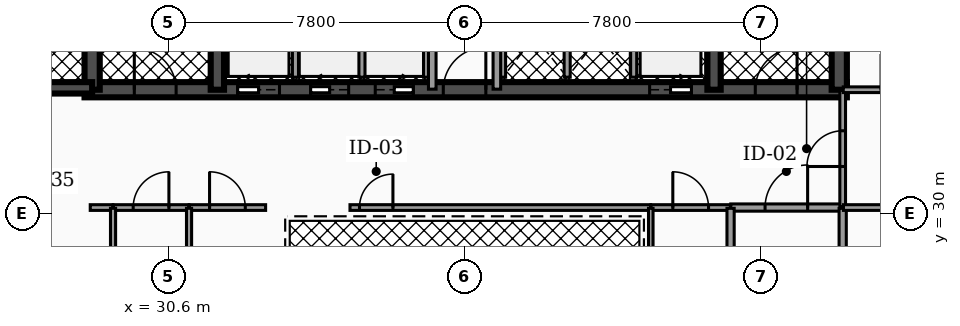
"""IFC4 building model, lengths in metres.
Left out: names, types, materials, properties, quantities, classifications, styles, units other than length and angle.
Written with IfcOpenShell. Run it as: python <this file> out.ifc"""

import sys

from ifc_helpers import new_model, si_unit, direction, frame, frame_2d, origin, place, context, subcontext, project, spatial, rectangle, extrude, element, fill, save


model = new_model("IFC4")
c1 = context("Model", 3, precision=1e-05, world=origin(), true_north=direction((0.0, 1.0)))
c2 = subcontext(c1, "Body", "Model", "MODEL_VIEW")
j1 = project(units=[si_unit("LENGTHUNIT", "METRE"), si_unit("PLANEANGLEUNIT", "RADIAN")], contexts=[c1])
p1 = place(None, origin())
s1 = spatial("IfcSite", under=j1, at=p1, CompositionType="ELEMENT")
p2 = place(p1, origin())
s2 = spatial("IfcBuilding", under=s1, at=p2, CompositionType="ELEMENT")
p3 = place(p2, frame((0.0, 0.0, 142.12)))
s3 = spatial("IfcBuildingStorey", under=s2, at=p3, CompositionType="ELEMENT", Elevation=142.12)
p4 = place(p3, frame((28.4, 33.25, 0.0), z_axis=(0.0, 0.0, 1.0), x_axis=(1.0, 0.0, 0.0)))
e1 = element("IfcWall", 1, at=p4, inside=s3, PredefinedType="SHEAR", context=c2, shape_type="SweptSolid", body=[
    extrude(rectangle(XDim=20.06, YDim=0.4, at=frame_2d((10.03, 0.0))), origin(), (0.0, 0.0, 1.0), 3.5),
])
p5 = place(p4, frame((4.03, 0.0, 0.0)))
e2 = element("IfcOpeningElement", 2, at=p5, cuts=e1, PredefinedType="OPENING", context=c2, shape_type="SweptSolid", body=[
    extrude(rectangle(XDim=1.1, YDim=2.15, at=frame_2d((0.55, 1.075))), frame((0.0, 0.21, 0.0), z_axis=(0.0, -1.0, 0.0), x_axis=(1.0, 0.0, 0.0)), (0.0, 0.0, 1.0), 0.42),
])
p6 = place(p4, frame((14.87, 0.0, 0.0)))
e3 = element("IfcOpeningElement", 3, at=p6, cuts=e1, PredefinedType="OPENING", context=c2, shape_type="SweptSolid", body=[
    extrude(rectangle(XDim=1.1, YDim=2.15, at=frame_2d((0.55, 1.075))), frame((0.0, 0.21, 0.0), z_axis=(0.0, -1.0, 0.0), x_axis=(1.0, 0.0, 0.0)), (0.0, 0.0, 1.0), 0.42),
])
p7 = place(p4, frame((5.95, 0.0, 0.0)))
e4 = element("IfcOpeningElement", 4, at=p7, cuts=e1, PredefinedType="OPENING", context=c2, shape_type="SweptSolid", body=[
    extrude(rectangle(XDim=1.0, YDim=2.1, at=frame_2d((0.5, 1.05))), frame((0.0, 0.21, 0.0), z_axis=(0.0, -1.0, 0.0), x_axis=(1.0, 0.0, 0.0)), (0.0, 0.0, 1.0), 0.42),
])
p8 = place(p4, frame((7.65, 0.0, 0.0)))
e5 = element("IfcOpeningElement", 5, at=p8, cuts=e1, PredefinedType="OPENING", context=c2, shape_type="SweptSolid", body=[
    extrude(rectangle(XDim=1.0, YDim=2.1, at=frame_2d((0.5, 1.05))), frame((0.0, 0.21, 0.0), z_axis=(0.0, -1.0, 0.0), x_axis=(1.0, 0.0, 0.0)), (0.0, 0.0, 1.0), 0.42),
])
p9 = place(p4, frame((1.31, 0.0, 0.0)))
e6 = element("IfcOpeningElement", 6, at=p9, cuts=e1, PredefinedType="OPENING", context=c2, shape_type="SweptSolid", body=[
    extrude(rectangle(XDim=1.1, YDim=2.2, at=frame_2d((0.55, 1.1))), frame((0.0, 0.21, 0.0), z_axis=(0.0, -1.0, 0.0), x_axis=(1.0, 0.0, 0.0)), (0.0, 0.0, 1.0), 0.42),
])
p10 = place(p4, frame((9.44, 0.0, 0.0)))
e7 = element("IfcOpeningElement", 7, at=p10, cuts=e1, PredefinedType="OPENING", context=c2, shape_type="SweptSolid", body=[
    extrude(rectangle(XDim=1.12, YDim=2.05, at=frame_2d((0.56, 1.025))), frame((0.0, 0.21, 0.0), z_axis=(0.0, -1.0, 0.0), x_axis=(1.0, 0.0, 0.0)), (0.0, 0.0, 1.0), 0.42),
])
p11 = place(p4, frame((17.65, 0.0, 0.0)))
e8 = element("IfcOpeningElement", 8, at=p11, cuts=e1, PredefinedType="OPENING", context=c2, shape_type="SweptSolid", body=[
    extrude(rectangle(XDim=1.1, YDim=2.2, at=frame_2d((0.55, 1.1))), frame((0.0, 0.21, 0.0), z_axis=(0.0, -1.0, 0.0), x_axis=(1.0, 0.0, 0.0)), (0.0, 0.0, 1.0), 0.42),
])
p12 = place(p3, frame((28.6, 33.25, 0.0), z_axis=(0.0, 0.0, 1.0), x_axis=(0.0, 1.0, 0.0)))
e9 = element("IfcWall", 9, at=p12, inside=s3, PredefinedType="SHEAR", context=c2, shape_type="SweptSolid", body=[
    extrude(rectangle(XDim=10.2, YDim=0.4, at=frame_2d((5.1, 0.0))), origin(), (0.0, 0.0, 1.0), 3.5),
])
for number, where, z_axis, x_axis in (
    (10, (31.895, 33.25, 0.0), (0.0, 0.0, 1.0), (0.0, 1.0, 0.0)),
    (11, (44.965, 33.25, 0.0), (0.0, 0.0, 1.0), (0.0, 1.0, 0.0)),
):
    element("IfcWall", number, at=place(p3, frame(where, z_axis=z_axis, x_axis=x_axis)), inside=s3, PredefinedType="SHEAR", context=c2, shape_type="SweptSolid", body=[
        extrude(rectangle(XDim=10.2, YDim=0.35, at=frame_2d((5.1, 0.0))), origin(), (0.0, 0.0, 1.0), 3.5),
    ])
p13 = place(p3, frame((48.26, 33.25, 0.0), z_axis=(0.0, 0.0, 1.0), x_axis=(0.0, 1.0, 0.0)))
e12 = element("IfcWall", 12, at=p13, inside=s3, PredefinedType="SHEAR", context=c2, shape_type="SweptSolid", body=[
    extrude(rectangle(XDim=10.2, YDim=0.4, at=frame_2d((5.1, 0.0))), origin(), (0.0, 0.0, 1.0), 3.5),
])
p14 = place(p3, frame((25.08, 33.3, 0.0), z_axis=(0.0, 0.0, 1.0), x_axis=(1.0, 0.0, 0.0)))
e13 = element("IfcWall", 13, at=p14, inside=s3, PredefinedType="SHEAR", context=c2, shape_type="SweptSolid", body=[
    extrude(rectangle(XDim=3.52, YDim=0.3, at=frame_2d((1.76, 0.0))), origin(), (0.0, 0.0, 1.0), 3.5),
])
p15 = place(p14, frame((1.335, 0.0, 0.0)))
e14 = element("IfcOpeningElement", 14, at=p15, cuts=e13, PredefinedType="OPENING", context=c2, shape_type="SweptSolid", body=[
    extrude(rectangle(XDim=0.95, YDim=2.2, at=frame_2d((0.475, 1.1))), frame((0.0, 0.16, 0.0), z_axis=(0.0, -1.0, 0.0), x_axis=(1.0, 0.0, 0.0)), (0.0, 0.0, 1.0), 0.32),
])
for number, where, z_axis, x_axis in (
    (15, (33.95, 33.58, 0.0), (0.0, 0.0, 1.0), (0.0, 1.0, 0.0)),
    (16, (42.85, 33.58, 0.0), (0.0, 0.0, 1.0), (0.0, 1.0, 0.0)),
):
    element("IfcWall", number, at=place(p3, frame(where, z_axis=z_axis, x_axis=x_axis)), inside=s3, PredefinedType="SOLIDWALL", context=c2, shape_type="SweptSolid", body=[
        extrude(rectangle(XDim=2.45, YDim=0.16, at=frame_2d((1.225, 0.0))), origin(), (0.0, 0.0, 1.0), 2.472),
    ])
for number, where, z_axis, x_axis in (
    (17, (35.7, 33.58, 0.0), (0.0, 0.0, 1.0), (0.0, 1.0, 0.0)),
    (18, (37.4, 33.58, 0.0), (0.0, 0.0, 1.0), (0.0, 1.0, 0.0)),
    (19, (39.4, 33.58, 0.0), (0.0, 0.0, 1.0), (0.0, 1.0, 0.0)),
    (20, (41.1, 33.58, 0.0), (0.0, 0.0, 1.0), (0.0, 1.0, 0.0)),
):
    element("IfcWall", number, at=place(p3, frame(where, z_axis=z_axis, x_axis=x_axis)), inside=s3, PredefinedType="SOLIDWALL", context=c2, shape_type="SweptSolid", body=[
        extrude(rectangle(XDim=2.25, YDim=0.16, at=frame_2d((1.125, 0.0))), origin(), (0.0, 0.0, 1.0), 2.472),
    ])
p16 = place(p3, frame((37.55, 33.265, 0.0), z_axis=(0.0, 0.0, 1.0), x_axis=(0.0, 1.0, 0.0)))
e21 = element("IfcWall", 21, at=p16, inside=s3, PredefinedType="PARTITIONING", context=c2, shape_type="SweptSolid", body=[
    extrude(rectangle(XDim=4.595, YDim=0.2, at=frame_2d((2.298, 0.0))), origin(), (0.0, 0.0, 1.0), 2.457),
])
p17 = place(p16, frame((3.058, 0.0, 0.0)))
e22 = element("IfcOpeningElement", 22, at=p17, cuts=e21, PredefinedType="OPENING", context=c2, shape_type="SweptSolid", body=[
    extrude(rectangle(XDim=0.88, YDim=2.05, at=frame_2d((0.44, 1.025))), frame((0.0, 0.11, 0.0), z_axis=(0.0, -1.0, 0.0), x_axis=(1.0, 0.0, 0.0)), (0.0, 0.0, 1.0), 0.22),
])
p18 = place(p3, frame((39.25, 33.265, 0.0), z_axis=(0.0, 0.0, 1.0), x_axis=(0.0, 1.0, 0.0)))
e23 = element("IfcWall", 23, at=p18, inside=s3, PredefinedType="PARTITIONING", context=c2, shape_type="SweptSolid", body=[
    extrude(rectangle(XDim=4.595, YDim=0.2, at=frame_2d((2.298, 0.0))), origin(), (0.0, 0.0, 1.0), 2.457),
])
p19 = place(p18, frame((3.058, 0.0, 0.0)))
e24 = element("IfcOpeningElement", 24, at=p19, cuts=e23, PredefinedType="OPENING", context=c2, shape_type="SweptSolid", body=[
    extrude(rectangle(XDim=0.88, YDim=2.05, at=frame_2d((0.44, 1.025))), frame((0.0, 0.11, 0.0), z_axis=(0.0, -1.0, 0.0), x_axis=(1.0, 0.0, 0.0)), (0.0, 0.0, 1.0), 0.22),
])
p20 = place(p3, frame((45.405, 30.15, 0.0), z_axis=(0.0, 0.0, 1.0), x_axis=(1.0, 0.0, 0.0)))
e25 = element("IfcWall", 25, at=p20, inside=s3, PredefinedType="PARTITIONING", context=c2, shape_type="SweptSolid", body=[
    extrude(rectangle(XDim=2.925, YDim=0.19, at=frame_2d((1.462, 0.0))), origin(), (0.0, 0.0, 1.0), 2.457),
])
p21 = place(p20, frame((0.903, 0.0, 0.0)))
e26 = element("IfcOpeningElement", 26, at=p21, cuts=e25, PredefinedType="OPENING", context=c2, shape_type="SweptSolid", body=[
    extrude(rectangle(XDim=1.12, YDim=2.05, at=frame_2d((0.56, 1.025))), frame((0.0, 0.105, 0.0), z_axis=(0.0, -1.0, 0.0), x_axis=(1.0, 0.0, 0.0)), (0.0, 0.0, 1.0), 0.21),
])
p22 = place(p3, frame((48.35, 30.17, 0.0), z_axis=(0.0, 0.0, 1.0), x_axis=(0.0, 1.0, 0.0)))
e27 = element("IfcWall", 27, at=p22, inside=s3, PredefinedType="PARTITIONING", context=c2, shape_type="SweptSolid", body=[
    extrude(rectangle(XDim=3.06, YDim=0.15, at=frame_2d((1.53, 0.0))), origin(), (0.0, 0.0, 1.0), 2.457),
])
p23 = place(p22, frame((1.06, 0.0, 0.0)))
e28 = element("IfcOpeningElement", 28, at=p23, cuts=e27, PredefinedType="OPENING", context=c2, shape_type="SweptSolid", body=[
    extrude(rectangle(XDim=0.94, YDim=2.05, at=frame_2d((0.47, 1.025))), frame((0.0, 0.085, 0.0), z_axis=(0.0, -1.0, 0.0), x_axis=(1.0, 0.0, 0.0)), (0.0, 0.0, 1.0), 0.17),
])
p24 = place(p3, frame((28.55, 30.15, 0.0), z_axis=(0.0, 0.0, 1.0), x_axis=(1.0, 0.0, 0.0)))
e29 = element("IfcWall", 29, at=p24, inside=s3, PredefinedType="PARTITIONING", context=c2, shape_type="SweptSolid", body=[
    extrude(rectangle(XDim=0.595, YDim=0.15, at=frame_2d((0.297, 0.0))), origin(), (0.0, 0.0, 1.0), 2.457),
])
p25 = place(p3, frame((29.155, 30.15, 0.0), z_axis=(0.0, 0.0, 1.0), x_axis=(1.0, 0.0, 0.0)))
e30 = element("IfcWall", 30, at=p25, inside=s3, PredefinedType="PARTITIONING", context=c2, shape_type="SweptSolid", body=[
    extrude(rectangle(XDim=1.99, YDim=0.15, at=frame_2d((0.995, 0.0))), origin(), (0.0, 0.0, 1.0), 2.457),
])
p26 = place(p25, frame((0.525, 0.0, 0.0)))
e31 = element("IfcOpeningElement", 31, at=p26, cuts=e30, PredefinedType="OPENING", context=c2, shape_type="SweptSolid", body=[
    extrude(rectangle(XDim=0.94, YDim=2.05, at=frame_2d((0.47, 1.025))), frame((0.0, 0.085, 0.0), z_axis=(0.0, -1.0, 0.0), x_axis=(1.0, 0.0, 0.0)), (0.0, 0.0, 1.0), 0.17),
])
p27 = place(p3, frame((31.155, 30.15, 0.0), z_axis=(0.0, 0.0, 1.0), x_axis=(1.0, 0.0, 0.0)))
e32 = element("IfcWall", 32, at=p27, inside=s3, PredefinedType="PARTITIONING", context=c2, shape_type="SweptSolid", body=[
    extrude(rectangle(XDim=2.01, YDim=0.15, at=frame_2d((1.005, 0.0))), origin(), (0.0, 0.0, 1.0), 2.457),
])
p28 = place(p27, frame((0.535, 0.0, 0.0)))
e33 = element("IfcOpeningElement", 33, at=p28, cuts=e32, PredefinedType="OPENING", context=c2, shape_type="SweptSolid", body=[
    extrude(rectangle(XDim=0.94, YDim=2.05, at=frame_2d((0.47, 1.025))), frame((0.0, 0.085, 0.0), z_axis=(0.0, -1.0, 0.0), x_axis=(1.0, 0.0, 0.0)), (0.0, 0.0, 1.0), 0.17),
])
p29 = place(p3, frame((35.385, 30.15, 0.0), z_axis=(0.0, 0.0, 1.0), x_axis=(1.0, 0.0, 0.0)))
e34 = element("IfcWall", 34, at=p29, inside=s3, PredefinedType="PARTITIONING", context=c2, shape_type="SweptSolid", body=[
    extrude(rectangle(XDim=7.91, YDim=0.15, at=frame_2d((3.955, 0.0))), origin(), (0.0, 0.0, 1.0), 2.457),
])
p30 = place(p29, frame((0.25, 0.0, 0.0)))
e35 = element("IfcOpeningElement", 35, at=p30, cuts=e34, PredefinedType="OPENING", context=c2, shape_type="SweptSolid", body=[
    extrude(rectangle(XDim=0.88, YDim=2.05, at=frame_2d((0.44, 1.025))), frame((0.0, 0.085, 0.0), z_axis=(0.0, -1.0, 0.0), x_axis=(1.0, 0.0, 0.0)), (0.0, 0.0, 1.0), 0.17),
])
p31 = place(p3, frame((43.305, 30.15, 0.0), z_axis=(0.0, 0.0, 1.0), x_axis=(1.0, 0.0, 0.0)))
e36 = element("IfcWall", 36, at=p31, inside=s3, PredefinedType="PARTITIONING", context=c2, shape_type="SweptSolid", body=[
    extrude(rectangle(XDim=2.09, YDim=0.15, at=frame_2d((1.045, 0.0))), origin(), (0.0, 0.0, 1.0), 2.457),
])
p32 = place(p31, frame((0.575, 0.0, 0.0)))
e37 = element("IfcOpeningElement", 37, at=p32, cuts=e36, PredefinedType="OPENING", context=c2, shape_type="SweptSolid", body=[
    extrude(rectangle(XDim=0.94, YDim=2.05, at=frame_2d((0.47, 1.025))), frame((0.0, 0.085, 0.0), z_axis=(0.0, -1.0, 0.0), x_axis=(1.0, 0.0, 0.0)), (0.0, 0.0, 1.0), 0.17),
])
for number, where, z_axis, x_axis in (
    (38, (45.4, 27.37, 0.0), (0.0, 0.0, 1.0), (0.0, 1.0, 0.0)),
    (39, (48.35, 27.37, 0.0), (0.0, 0.0, 1.0), (0.0, 1.0, 0.0)),
):
    element("IfcWall", number, at=place(p3, frame(where, z_axis=z_axis, x_axis=x_axis)), inside=s3, PredefinedType="PARTITIONING", context=c2, shape_type="SweptSolid", body=[
        extrude(rectangle(XDim=2.76, YDim=0.19, at=frame_2d((1.38, 0.0))), origin(), (0.0, 0.0, 1.0), 2.457),
    ])
p33 = place(p3, frame((48.37, 30.15, 0.0), z_axis=(0.0, 0.0, 1.0), x_axis=(1.0, 0.0, 0.0)))
e40 = element("IfcWall", 40, at=p33, inside=s3, PredefinedType="PARTITIONING", context=c2, shape_type="SweptSolid", body=[
    extrude(rectangle(XDim=1.309, YDim=0.15, at=frame_2d((0.654, 0.0))), origin(), (0.0, 0.0, 1.0), 2.457),
])
p34 = place(p3, frame((48.365, 33.25, 0.0), z_axis=(0.0, 0.0, 1.0), x_axis=(1.0, 0.0, 0.0)))
e41 = element("IfcWall", 41, at=p34, inside=s3, PredefinedType="PARTITIONING", context=c2, shape_type="SweptSolid", body=[
    extrude(rectangle(XDim=2.93, YDim=0.15, at=frame_2d((1.465, 0.0))), origin(), (0.0, 0.0, 1.0), 2.457),
])
p35 = place(p34, frame((0.995, 0.0, 0.0)))
e42 = element("IfcOpeningElement", 42, at=p35, cuts=e41, PredefinedType="OPENING", context=c2, shape_type="SweptSolid", body=[
    extrude(rectangle(XDim=0.94, YDim=2.05, at=frame_2d((0.47, 1.025))), frame((0.0, 0.085, 0.0), z_axis=(0.0, -1.0, 0.0), x_axis=(1.0, 0.0, 0.0)), (0.0, 0.0, 1.0), 0.17),
])
p36 = place(p3, frame((29.15, 27.17, 0.0), z_axis=(0.0, 0.0, 1.0), x_axis=(0.0, 1.0, 0.0)))
e43 = element("IfcWall", 43, at=p36, inside=s3, PredefinedType="PARTITIONING", context=c2, shape_type="SweptSolid", body=[
    extrude(rectangle(XDim=2.96, YDim=0.135, at=frame_2d((1.48, 0.0))), origin(), (0.0, 0.0, 1.0), 2.457),
])
p37 = place(p36, frame((1.05, 0.0, 0.0)))
e44 = element("IfcOpeningElement", 44, at=p37, cuts=e43, PredefinedType="OPENING", context=c2, shape_type="SweptSolid", body=[
    extrude(rectangle(XDim=0.86, YDim=2.05, at=frame_2d((0.43, 1.025))), frame((0.0, 0.077, 0.0), z_axis=(0.0, -1.0, 0.0), x_axis=(1.0, 0.0, 0.0)), (0.0, 0.0, 1.0), 0.155),
])
p38 = place(p3, frame((31.15, 27.17, 0.0), z_axis=(0.0, 0.0, 1.0), x_axis=(0.0, 1.0, 0.0)))
e45 = element("IfcWall", 45, at=p38, inside=s3, PredefinedType="PARTITIONING", context=c2, shape_type="SweptSolid", body=[
    extrude(rectangle(XDim=2.96, YDim=0.135, at=frame_2d((1.48, 0.0))), origin(), (0.0, 0.0, 1.0), 2.457),
])
p39 = place(p3, frame((43.3, 24.078, 0.0), z_axis=(0.0, 0.0, 1.0), x_axis=(0.0, 1.0, 0.0)))
e46 = element("IfcWall", 46, at=p39, inside=s3, PredefinedType="PARTITIONING", context=c2, shape_type="SweptSolid", body=[
    extrude(rectangle(XDim=6.052, YDim=0.12, at=frame_2d((3.026, 0.0))), origin(), (0.0, 0.0, 1.0), 2.457),
])
p40 = place(p5, origin())
e47 = element("IfcDoor", 47, at=p40, inside=s3, OperationType="SLIDING_TO_LEFT", PredefinedType="DOOR", context=c2, shape_type="SweptSolid", body=[
    extrude(rectangle(XDim=1.1, YDim=2.15, at=frame_2d((0.55, 1.075))), frame((0.0, 0.025, 0.0), z_axis=(0.0, -1.0, 0.0), x_axis=(1.0, 0.0, 0.0)), (0.0, 0.0, 1.0), 0.05),
])
fill(e2, e47)
p41 = place(p6, origin())
e48 = element("IfcDoor", 48, at=p41, inside=s3, OperationType="SLIDING_TO_RIGHT", PredefinedType="DOOR", context=c2, shape_type="SweptSolid", body=[
    extrude(rectangle(XDim=1.1, YDim=2.15, at=frame_2d((0.55, 1.075))), frame((0.0, 0.025, 0.0), z_axis=(0.0, -1.0, 0.0), x_axis=(1.0, 0.0, 0.0)), (0.0, 0.0, 1.0), 0.05),
])
fill(e3, e48)
p42 = place(p7, origin())
e49 = element("IfcDoor", 49, at=p42, inside=s3, OperationType="SLIDING_TO_LEFT", PredefinedType="DOOR", context=c2, shape_type="SweptSolid", body=[
    extrude(rectangle(XDim=1.0, YDim=2.1, at=frame_2d((0.5, 1.05))), frame((0.0, 0.025, 0.0), z_axis=(0.0, -1.0, 0.0), x_axis=(1.0, 0.0, 0.0)), (0.0, 0.0, 1.0), 0.05),
])
fill(e4, e49)
p43 = place(p8, origin())
e50 = element("IfcDoor", 50, at=p43, inside=s3, OperationType="SLIDING_TO_RIGHT", PredefinedType="DOOR", context=c2, shape_type="SweptSolid", body=[
    extrude(rectangle(XDim=1.0, YDim=2.1, at=frame_2d((0.5, 1.05))), frame((0.0, 0.025, 0.0), z_axis=(0.0, -1.0, 0.0), x_axis=(1.0, 0.0, 0.0)), (0.0, 0.0, 1.0), 0.05),
])
fill(e5, e50)
p44 = place(p9, origin())
e51 = element("IfcDoor", 51, at=p44, inside=s3, OperationType="SINGLE_SWING_LEFT", PredefinedType="DOOR", context=c2, shape_type="SweptSolid", body=[
    extrude(rectangle(XDim=1.1, YDim=2.2, at=frame_2d((0.55, 1.1))), frame((0.0, 0.025, 0.0), z_axis=(0.0, -1.0, 0.0), x_axis=(1.0, 0.0, 0.0)), (0.0, 0.0, 1.0), 0.05),
])
fill(e6, e51)
p45 = place(p10, origin())
e52 = element("IfcDoor", 52, at=p45, inside=s3, OperationType="SINGLE_SWING_RIGHT", PredefinedType="DOOR", context=c2, shape_type="SweptSolid", body=[
    extrude(rectangle(XDim=1.12, YDim=2.05, at=frame_2d((0.56, 1.025))), frame((0.0, 0.025, 0.0), z_axis=(0.0, -1.0, 0.0), x_axis=(1.0, 0.0, 0.0)), (0.0, 0.0, 1.0), 0.05),
])
fill(e7, e52)
p46 = place(p11, origin())
e53 = element("IfcDoor", 53, at=p46, inside=s3, OperationType="SINGLE_SWING_RIGHT", PredefinedType="DOOR", context=c2, shape_type="SweptSolid", body=[
    extrude(rectangle(XDim=1.1, YDim=2.2, at=frame_2d((0.55, 1.1))), frame((0.0, 0.025, 0.0), z_axis=(0.0, -1.0, 0.0), x_axis=(1.0, 0.0, 0.0)), (0.0, 0.0, 1.0), 0.05),
])
fill(e8, e53)
p47 = place(p21, origin())
e54 = element("IfcDoor", 54, at=p47, inside=s3, OperationType="SINGLE_SWING_RIGHT", PredefinedType="DOOR", context=c2, shape_type="SweptSolid", body=[
    extrude(rectangle(XDim=1.12, YDim=2.05, at=frame_2d((0.56, 1.025))), frame((0.0, 0.025, 0.0), z_axis=(0.0, -1.0, 0.0), x_axis=(1.0, 0.0, 0.0)), (0.0, 0.0, 1.0), 0.05),
])
fill(e26, e54)
p48 = place(p23, origin())
e55 = element("IfcDoor", 55, at=p48, inside=s3, OperationType="SINGLE_SWING_LEFT", PredefinedType="DOOR", context=c2, shape_type="SweptSolid", body=[
    extrude(rectangle(XDim=0.94, YDim=2.05, at=frame_2d((0.47, 1.025))), frame((0.0, 0.025, 0.0), z_axis=(0.0, -1.0, 0.0), x_axis=(1.0, 0.0, 0.0)), (0.0, 0.0, 1.0), 0.05),
])
fill(e28, e55)
p49 = place(p26, origin())
e56 = element("IfcDoor", 56, at=p49, inside=s3, OperationType="SINGLE_SWING_RIGHT", PredefinedType="DOOR", context=c2, shape_type="SweptSolid", body=[
    extrude(rectangle(XDim=0.94, YDim=2.05, at=frame_2d((0.47, 1.025))), frame((0.0, 0.025, 0.0), z_axis=(0.0, -1.0, 0.0), x_axis=(1.0, 0.0, 0.0)), (0.0, 0.0, 1.0), 0.05),
])
fill(e31, e56)
p50 = place(p28, origin())
e57 = element("IfcDoor", 57, at=p50, inside=s3, OperationType="SINGLE_SWING_LEFT", PredefinedType="DOOR", context=c2, shape_type="SweptSolid", body=[
    extrude(rectangle(XDim=0.94, YDim=2.05, at=frame_2d((0.47, 1.025))), frame((0.0, 0.025, 0.0), z_axis=(0.0, -1.0, 0.0), x_axis=(1.0, 0.0, 0.0)), (0.0, 0.0, 1.0), 0.05),
])
fill(e33, e57)
p51 = place(p30, origin())
e58 = element("IfcDoor", 58, at=p51, inside=s3, OperationType="SINGLE_SWING_RIGHT", PredefinedType="DOOR", context=c2, shape_type="SweptSolid", body=[
    extrude(rectangle(XDim=0.88, YDim=2.05, at=frame_2d((0.44, 1.025))), frame((0.0, 0.025, 0.0), z_axis=(0.0, -1.0, 0.0), x_axis=(1.0, 0.0, 0.0)), (0.0, 0.0, 1.0), 0.05),
])
fill(e35, e58)
p52 = place(p32, origin())
e59 = element("IfcDoor", 59, at=p52, inside=s3, OperationType="SINGLE_SWING_LEFT", PredefinedType="DOOR", context=c2, shape_type="SweptSolid", body=[
    extrude(rectangle(XDim=0.94, YDim=2.05, at=frame_2d((0.47, 1.025))), frame((0.0, 0.025, 0.0), z_axis=(0.0, -1.0, 0.0), x_axis=(1.0, 0.0, 0.0)), (0.0, 0.0, 1.0), 0.05),
])
fill(e37, e59)
save(model, sys.argv[1])
